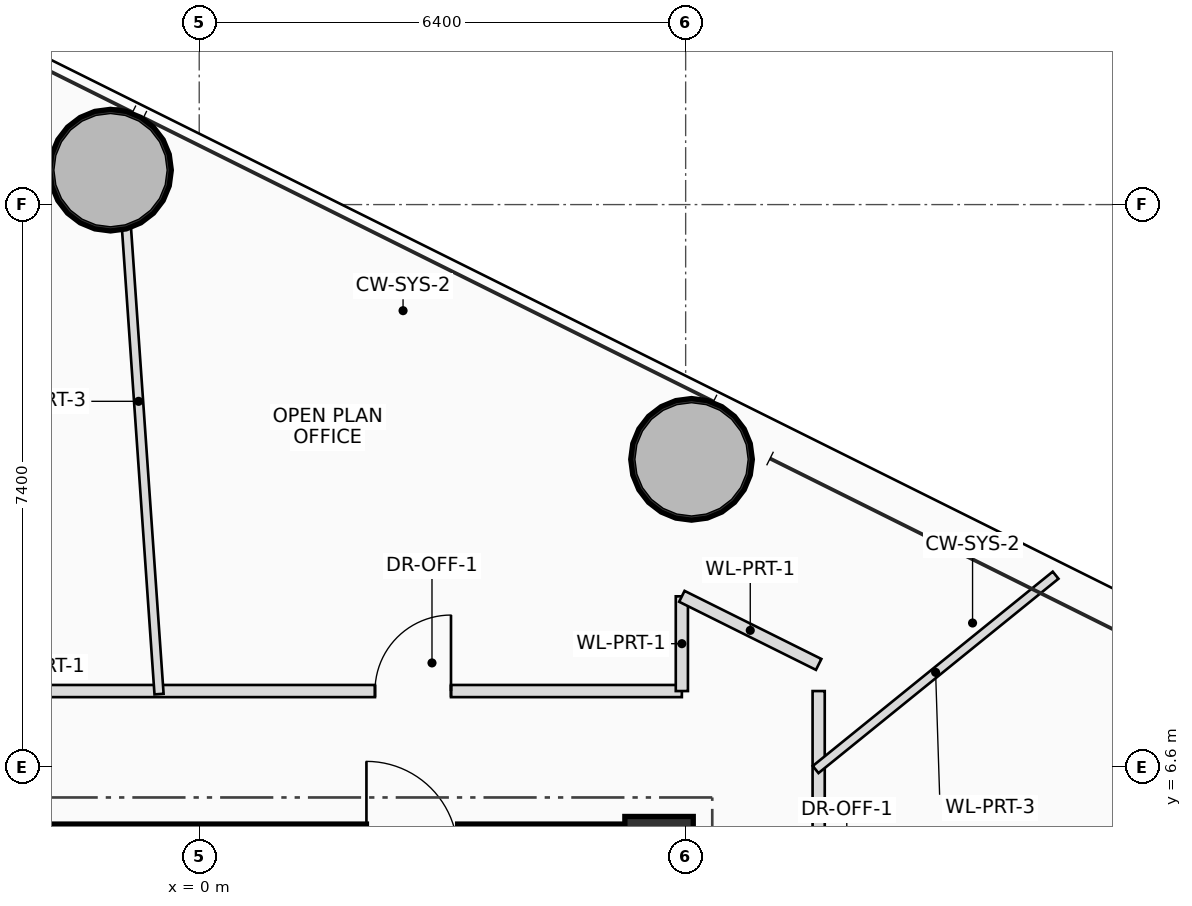
"""IFC4 building model, lengths in metres.
Left out: names, types, materials, properties, quantities, classifications, styles, units other than length and angle.
Written with IfcOpenShell. Run it as: python <this file> out.ifc"""

import sys

from ifc_helpers import new_model, si_unit, direction, frame, frame_2d, origin, origin_2d, place, context, subcontext, project, spatial, rectangle, hollow_circle, extrude, source, transform, mapped, element, fill, save


model = new_model("IFC4")
c1 = context("Model", 3, precision=1e-05, world=origin(), true_north=direction((0.0, 1.0)))
c2 = subcontext(c1, "Body", "Model", "MODEL_VIEW")
j1 = project(units=[si_unit("LENGTHUNIT", "METRE"), si_unit("PLANEANGLEUNIT", "RADIAN")], contexts=[c1])
p1 = place(None, origin())
s1 = spatial("IfcSite", under=j1, at=p1, CompositionType="ELEMENT")
p2 = place(p1, origin())
s2 = spatial("IfcBuilding", under=s1, at=p2, CompositionType="ELEMENT")
p3 = place(p2, frame((0.0, 0.0, 46.0)))
s3 = spatial("IfcBuildingStorey", under=s2, at=p3, CompositionType="ELEMENT", Elevation=46.0)
m1 = source(origin(), c2, "Body", "SweptSolid", [
    extrude(rectangle(XDim=0.9, YDim=0.9, at=origin_2d()), origin(), (0.0, 0.0, 1.0), 3.7),
])
p4 = place(p3, frame((6.05, 5.5, 0.0), z_axis=(0.0, 0.0, 1.0), x_axis=(1.0, 0.0, 0.0)))
e1 = element("IfcColumn", 1, at=p4, inside=s3, PredefinedType="COLUMN", context=c2, shape_type="MappedRepresentation", body=[
    mapped(m1, transform((0.0, 0.0, 0.0), scale=1.0)),
])
p5 = place(p3, frame((-6.4, 5.475, 0.0), z_axis=(0.0, 0.0, 1.0), x_axis=(1.0, 0.0, 0.0)))
e2 = element("IfcWall", 2, at=p5, inside=s3, PredefinedType="SHEAR", context=c2, shape_type="SweptSolid", body=[
    extrude(rectangle(XDim=12.8, YDim=0.75, at=frame_2d((6.4, 0.0))), origin(), (0.0, 0.0, 1.0), 3.7),
])
p6 = place(p5, frame((8.6, 0.0, 0.0)))
e3 = element("IfcOpeningElement", 3, at=p6, cuts=e2, PredefinedType="OPENING", context=c2, shape_type="SweptSolid", body=[
    extrude(rectangle(XDim=1.2, YDim=2.2, at=frame_2d((0.6, 1.1))), frame((0.0, 0.385, 0.0), z_axis=(0.0, -1.0, 0.0), x_axis=(1.0, 0.0, 0.0)), (0.0, 0.0, 1.0), 0.77),
])
m2 = source(origin(), c2, "Body", "SweptSolid", [
    extrude(hollow_circle(Radius=0.8, WallThickness=0.055, at=origin_2d()), origin(), (0.0, 0.0, 1.0), 3.7),
])
for number, where, z_axis, x_axis in (
    (4, (6.477, 10.648, 0.0), (0.0, 0.0, 1.0), (1.0, 0.0, 0.0)),
    (5, (-1.167, 14.453, 0.0), (0.0, 0.0, 1.0), (1.0, 0.0, 0.0)),
):
    element("IfcColumn", number, at=place(p3, frame(where, z_axis=z_axis, x_axis=x_axis)), inside=s3, PredefinedType="COLUMN", context=c2, shape_type="MappedRepresentation", body=[
        mapped(m2, transform((0.0, 0.0, 0.0), scale=1.0)),
    ])
p7 = place(p3, frame((-6.35, 7.6, 0.0), z_axis=(0.0, 0.0, 1.0), x_axis=(1.0, 0.0, 0.0)))
e6 = element("IfcWall", 6, at=p7, inside=s3, PredefinedType="PARTITIONING", context=c2, shape_type="SweptSolid", body=[
    extrude(rectangle(XDim=12.7, YDim=0.16, at=frame_2d((6.35, 0.0))), origin(), (0.0, 0.0, 1.0), 2.765),
])
p8 = place(p7, frame((8.663, 0.0, 0.0)))
e7 = element("IfcOpeningElement", 7, at=p8, cuts=e6, PredefinedType="OPENING", context=c2, shape_type="SweptSolid", body=[
    extrude(rectangle(XDim=1.0, YDim=2.25, at=frame_2d((0.5, 1.125))), frame((0.0, 0.09, 0.0), z_axis=(0.0, -1.0, 0.0), x_axis=(1.0, 0.0, 0.0)), (0.0, 0.0, 1.0), 0.18),
])
p9 = place(p3, frame((6.35, 7.6, 0.0), z_axis=(0.0, 0.0, 1.0), x_axis=(0.0, 1.0, 0.0)))
e8 = element("IfcWall", 8, at=p9, inside=s3, PredefinedType="PARTITIONING", context=c2, shape_type="SweptSolid", body=[
    extrude(rectangle(XDim=1.246, YDim=0.16, at=frame_2d((0.623, 0.0))), origin(), (0.0, 0.0, 1.0), 2.765),
])
p10 = place(p3, frame((6.35, 8.846, 0.0), z_axis=(0.0, 0.0, 1.0), x_axis=(0.895251454268, -0.445561256879, 0.0)))
e9 = element("IfcWall", 9, at=p10, inside=s3, PredefinedType="PARTITIONING", context=c2, shape_type="SweptSolid", body=[
    extrude(rectangle(XDim=2.01, YDim=0.16, at=frame_2d((1.005, 0.0))), origin(), (0.0, 0.0, 1.0), 2.765),
])
p11 = place(p3, frame((8.15, 7.6, 0.0), z_axis=(0.0, 0.0, 1.0), x_axis=(0.0, -1.0, 0.0)))
e10 = element("IfcWall", 10, at=p11, inside=s3, PredefinedType="PARTITIONING", context=c2, shape_type="SweptSolid", body=[
    extrude(rectangle(XDim=7.58, YDim=0.16, at=frame_2d((3.79, 0.0))), origin(), (0.0, 0.0, 1.0), 2.765),
])
p12 = place(p11, frame((2.89, 0.0, 0.0)))
e11 = element("IfcOpeningElement", 11, at=p12, cuts=e10, PredefinedType="OPENING", context=c2, shape_type="SweptSolid", body=[
    extrude(rectangle(XDim=1.0, YDim=2.25, at=frame_2d((0.5, 1.125))), frame((0.0, 0.09, 0.0), z_axis=(0.0, -1.0, 0.0), x_axis=(1.0, 0.0, 0.0)), (0.0, 0.0, 1.0), 0.18),
])
p13 = place(p3, frame((8.11, 6.567, 0.0), z_axis=(0.0, 0.0, 1.0), x_axis=(0.777144107081, 0.629322681007, 0.0)))
e12 = element("IfcWall", 12, at=p13, inside=s3, PredefinedType="PARTITIONING", context=c2, shape_type="SweptSolid", body=[
    extrude(rectangle(XDim=4.063, YDim=0.12, at=frame_2d((2.031, 0.0))), origin(), (0.0, 0.0, 1.0), 2.925),
])
p14 = place(p3, frame((-0.529, 7.56, 0.0), z_axis=(0.0, 0.0, 1.0), x_axis=(-0.069775328769, 0.997562731609, 0.0)))
e13 = element("IfcWall", 13, at=p14, inside=s3, PredefinedType="PARTITIONING", context=c2, shape_type="SweptSolid", body=[
    extrude(rectangle(XDim=7.722, YDim=0.12, at=frame_2d((3.861, 0.0))), origin(), (0.0, 0.0, 1.0), 2.965),
])
p15 = place(p8, origin())
e14 = element("IfcDoor", 14, at=p15, inside=s3, OperationType="SINGLE_SWING_RIGHT", PredefinedType="DOOR", context=c2, shape_type="SweptSolid", body=[
    extrude(rectangle(XDim=1.0, YDim=2.25, at=frame_2d((0.5, 1.125))), frame((0.0, 0.025, 0.0), z_axis=(0.0, -1.0, 0.0), x_axis=(1.0, 0.0, 0.0)), (0.0, 0.0, 1.0), 0.05),
])
fill(e7, e14)
save(model, sys.argv[1])
